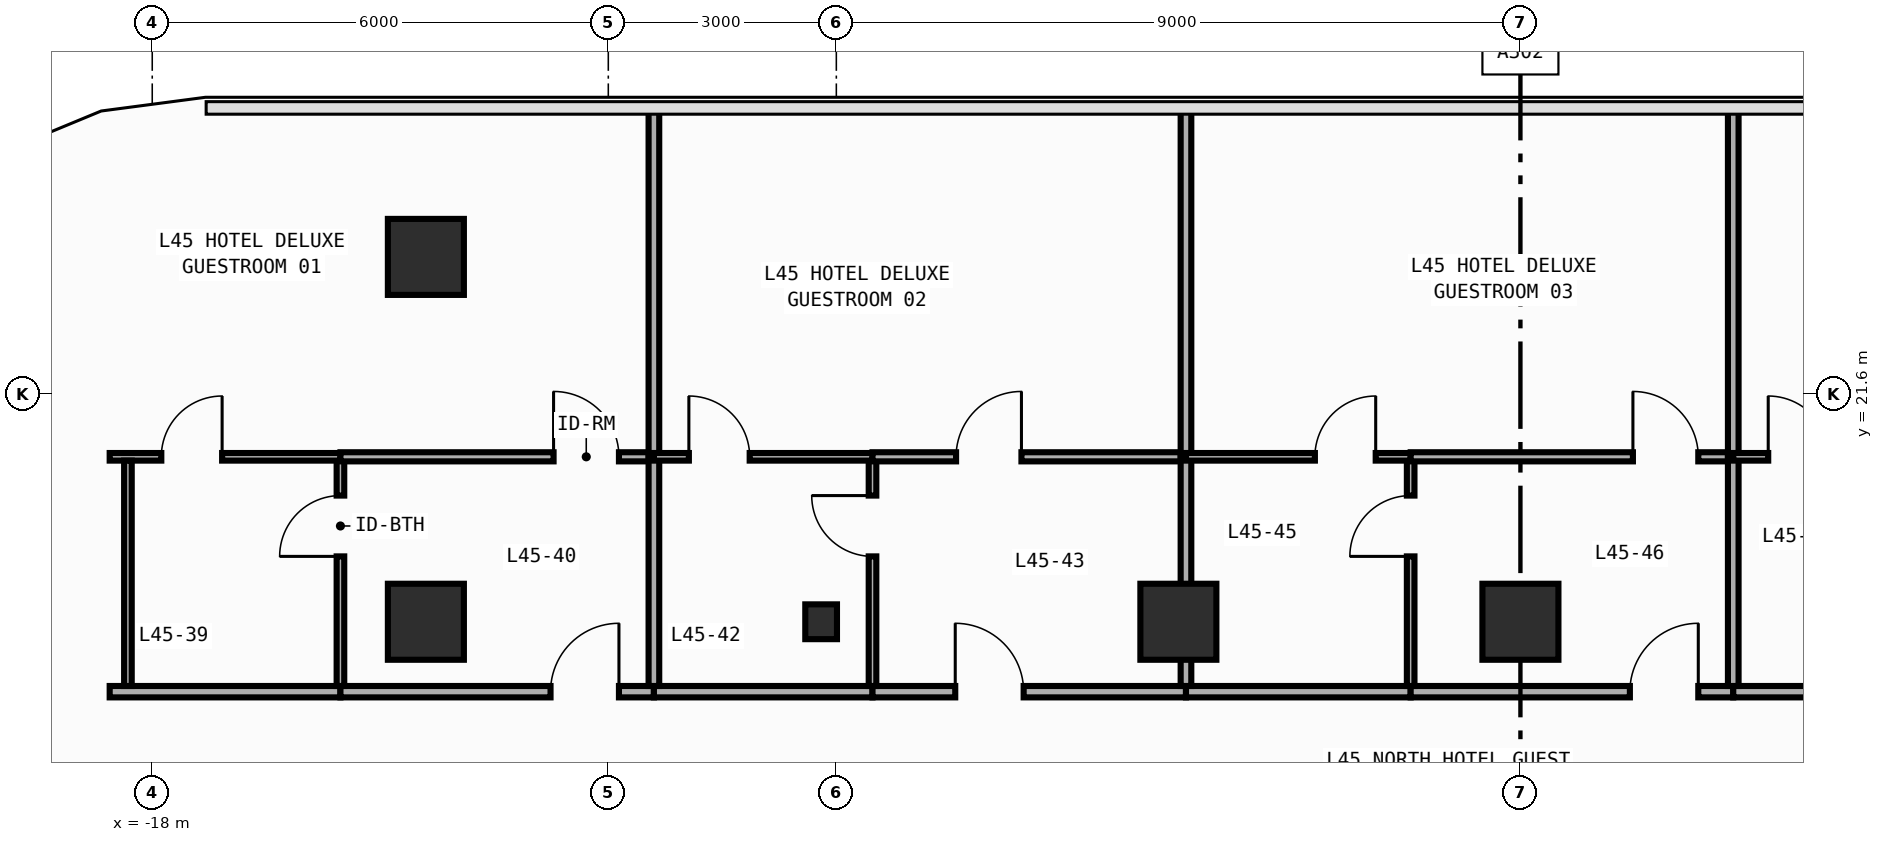
"""IFC4 building model, lengths in metres.
Left out: names, types, materials, properties, quantities, classifications, styles, units other than length and angle.
Written with IfcOpenShell. Run it as: python <this file> out.ifc"""

import sys

from ifc_helpers import new_model, si_unit, direction, frame, frame_2d, origin, origin_2d, place, context, subcontext, project, spatial, rectangle, i_section, extrude, element, fill, save


model = new_model("IFC4")
c1 = context("Model", 3, precision=1e-05, world=origin(), true_north=direction((0.0, 1.0)))
c2 = subcontext(c1, "Body", "Model", "MODEL_VIEW")
j1 = project(units=[si_unit("LENGTHUNIT", "METRE"), si_unit("PLANEANGLEUNIT", "RADIAN")], contexts=[c1])
p1 = place(None, origin())
s1 = spatial("IfcSite", under=j1, at=p1, CompositionType="ELEMENT")
p2 = place(p1, origin())
s2 = spatial("IfcBuilding", under=s1, at=p2, CompositionType="ELEMENT")
p3 = place(p2, frame((0.0, 0.0, 195.4)))
s3 = spatial("IfcBuildingStorey", under=s2, at=p3, CompositionType="ELEMENT", Elevation=195.4)
p4 = place(p3, frame((-9.2, 18.6, 0.0), z_axis=(0.0, 0.0, 1.0), x_axis=(1.0, 0.0, 0.0)))
e1 = element("IfcColumn", 1, at=p4, inside=s3, PredefinedType="COLUMN", context=c2, shape_type="SweptSolid", body=[
    extrude(i_section(OverallWidth=0.417, OverallDepth=0.458, WebThickness=0.03, FlangeThickness=0.05, FilletRadius=0.022, at=origin_2d()), origin(), (0.0, 0.0, 1.0), 3.8),
])
for number, where, z_axis, x_axis in (
    (2, (-14.4, 18.6, 0.0), (0.0, 0.0, 1.0), (1.0, 0.0, 0.0)),
    (3, (-4.5, 18.6, 0.0), (0.0, 0.0, 1.0), (1.0, 0.0, 0.0)),
    (4, (0.0, 18.6, 0.0), (0.0, 0.0, 1.0), (1.0, 0.0, 0.0)),
    (5, (-14.4, 23.4, 0.0), (0.0, 0.0, 1.0), (1.0, 0.0, 0.0)),
):
    element("IfcColumn", number, at=place(p3, frame(where, z_axis=z_axis, x_axis=x_axis)), inside=s3, PredefinedType="COLUMN", context=c2, shape_type="SweptSolid", body=[
        extrude(rectangle(XDim=1.0, YDim=1.0, at=origin_2d()), origin(), (0.0, 0.0, 1.0), 3.8),
    ])
p5 = place(p3, frame((-18.56, 17.68, 0.0), z_axis=(0.0, 0.0, 1.0), x_axis=(1.0, 0.0, 0.0)))
e6 = element("IfcWall", 6, at=p5, inside=s3, PredefinedType="PARTITIONING", context=c2, shape_type="SweptSolid", body=[
    extrude(rectangle(XDim=3.036, YDim=0.15, at=frame_2d((1.518, 0.0))), origin(), (0.0, 0.0, 1.0), 3.54),
])
p6 = place(p3, frame((-15.524, 17.68, 0.0), z_axis=(0.0, 0.0, 1.0), x_axis=(1.0, 0.0, 0.0)))
e7 = element("IfcWall", 7, at=p6, inside=s3, PredefinedType="PARTITIONING", context=c2, shape_type="SweptSolid", body=[
    extrude(rectangle(XDim=4.124, YDim=0.15, at=frame_2d((2.062, 0.0))), origin(), (0.0, 0.0, 1.0), 3.54),
])
p7 = place(p6, frame((2.764, 0.0, 0.0)))
e8 = element("IfcOpeningElement", 8, at=p7, cuts=e7, PredefinedType="OPENING", context=c2, shape_type="SweptSolid", body=[
    extrude(rectangle(XDim=0.9, YDim=2.15, at=frame_2d((0.45, 1.075))), frame((0.0, 0.085, 0.0), z_axis=(0.0, -1.0, 0.0), x_axis=(1.0, 0.0, 0.0)), (0.0, 0.0, 1.0), 0.17),
])
p8 = place(p3, frame((-11.4, 17.68, 0.0), z_axis=(0.0, 0.0, 1.0), x_axis=(1.0, 0.0, 0.0)))
e9 = element("IfcWall", 9, at=p8, inside=s3, PredefinedType="PARTITIONING", context=c2, shape_type="SweptSolid", body=[
    extrude(rectangle(XDim=2.876, YDim=0.15, at=frame_2d((1.438, 0.0))), origin(), (0.0, 0.0, 1.0), 3.54),
])
p9 = place(p3, frame((-8.524, 17.68, 0.0), z_axis=(0.0, 0.0, 1.0), x_axis=(1.0, 0.0, 0.0)))
e10 = element("IfcWall", 10, at=p9, inside=s3, PredefinedType="PARTITIONING", context=c2, shape_type="SweptSolid", body=[
    extrude(rectangle(XDim=4.124, YDim=0.15, at=frame_2d((2.062, 0.0))), origin(), (0.0, 0.0, 1.0), 3.54),
])
p10 = place(p9, frame((1.088, 0.0, 0.0)))
e11 = element("IfcOpeningElement", 11, at=p10, cuts=e10, PredefinedType="OPENING", context=c2, shape_type="SweptSolid", body=[
    extrude(rectangle(XDim=0.9, YDim=2.15, at=frame_2d((0.45, 1.075))), frame((0.0, 0.085, 0.0), z_axis=(0.0, -1.0, 0.0), x_axis=(1.0, 0.0, 0.0)), (0.0, 0.0, 1.0), 0.17),
])
p11 = place(p3, frame((-4.4, 17.68, 0.0), z_axis=(0.0, 0.0, 1.0), x_axis=(1.0, 0.0, 0.0)))
e12 = element("IfcWall", 12, at=p11, inside=s3, PredefinedType="PARTITIONING", context=c2, shape_type="SweptSolid", body=[
    extrude(rectangle(XDim=2.956, YDim=0.15, at=frame_2d((1.478, 0.0))), origin(), (0.0, 0.0, 1.0), 3.54),
])
p12 = place(p3, frame((-1.444, 17.68, 0.0), z_axis=(0.0, 0.0, 1.0), x_axis=(1.0, 0.0, 0.0)))
e13 = element("IfcWall", 13, at=p12, inside=s3, PredefinedType="PARTITIONING", context=c2, shape_type="SweptSolid", body=[
    extrude(rectangle(XDim=4.244, YDim=0.15, at=frame_2d((2.122, 0.0))), origin(), (0.0, 0.0, 1.0), 3.54),
])
p13 = place(p12, frame((2.884, 0.0, 0.0)))
e14 = element("IfcOpeningElement", 14, at=p13, cuts=e13, PredefinedType="OPENING", context=c2, shape_type="SweptSolid", body=[
    extrude(rectangle(XDim=0.9, YDim=2.15, at=frame_2d((0.45, 1.075))), frame((0.0, 0.085, 0.0), z_axis=(0.0, -1.0, 0.0), x_axis=(1.0, 0.0, 0.0)), (0.0, 0.0, 1.0), 0.17),
])
p14 = place(p3, frame((2.8, 17.68, 0.0), z_axis=(0.0, 0.0, 1.0), x_axis=(1.0, 0.0, 0.0)))
e15 = element("IfcWall", 15, at=p14, inside=s3, PredefinedType="PARTITIONING", context=c2, shape_type="SweptSolid", body=[
    extrude(rectangle(XDim=2.996, YDim=0.15, at=frame_2d((1.498, 0.0))), origin(), (0.0, 0.0, 1.0), 3.54),
])
p15 = place(p3, frame((-15.524, 17.755, 0.0), z_axis=(0.0, 0.0, 1.0), x_axis=(0.0, 1.0, 0.0)))
e16 = element("IfcWall", 16, at=p15, inside=s3, PredefinedType="PARTITIONING", context=c2, shape_type="SweptSolid", body=[
    extrude(rectangle(XDim=2.965, YDim=0.1, at=frame_2d((1.482, 0.0))), origin(), (0.0, 0.0, 1.0), 3.54),
])
p16 = place(p15, frame((1.705, 0.0, 0.0)))
e17 = element("IfcOpeningElement", 17, at=p16, cuts=e16, PredefinedType="OPENING", context=c2, shape_type="SweptSolid", body=[
    extrude(rectangle(XDim=0.8, YDim=2.1, at=frame_2d((0.4, 1.05))), frame((0.0, 0.06, 0.0), z_axis=(0.0, -1.0, 0.0), x_axis=(1.0, 0.0, 0.0)), (0.0, 0.0, 1.0), 0.12),
])
p17 = place(p3, frame((-18.56, 20.77, 0.0), z_axis=(0.0, 0.0, 1.0), x_axis=(1.0, 0.0, 0.0)))
e18 = element("IfcWall", 18, at=p17, inside=s3, PredefinedType="PARTITIONING", context=c2, shape_type="SweptSolid", body=[
    extrude(rectangle(XDim=3.036, YDim=0.1, at=frame_2d((1.518, 0.0))), origin(), (0.0, 0.0, 1.0), 3.54),
])
p18 = place(p17, frame((0.679, 0.0, 0.0)))
e19 = element("IfcOpeningElement", 19, at=p18, cuts=e18, PredefinedType="OPENING", context=c2, shape_type="SweptSolid", body=[
    extrude(rectangle(XDim=0.8, YDim=2.1, at=frame_2d((0.4, 1.05))), frame((0.0, 0.06, 0.0), z_axis=(0.0, -1.0, 0.0), x_axis=(1.0, 0.0, 0.0)), (0.0, 0.0, 1.0), 0.12),
])
p19 = place(p3, frame((-15.524, 20.77, 0.0), z_axis=(0.0, 0.0, 1.0), x_axis=(1.0, 0.0, 0.0)))
e20 = element("IfcWall", 20, at=p19, inside=s3, PredefinedType="PARTITIONING", context=c2, shape_type="SweptSolid", body=[
    extrude(rectangle(XDim=4.124, YDim=0.12, at=frame_2d((2.062, 0.0))), origin(), (0.0, 0.0, 1.0), 3.54),
])
p20 = place(p19, frame((2.804, 0.0, 0.0)))
e21 = element("IfcOpeningElement", 21, at=p20, cuts=e20, PredefinedType="OPENING", context=c2, shape_type="SweptSolid", body=[
    extrude(rectangle(XDim=0.86, YDim=2.15, at=frame_2d((0.43, 1.075))), frame((0.0, 0.07, 0.0), z_axis=(0.0, -1.0, 0.0), x_axis=(1.0, 0.0, 0.0)), (0.0, 0.0, 1.0), 0.14),
])
p21 = place(p3, frame((-11.4, 17.755, 0.0), z_axis=(0.0, 0.0, 1.0), x_axis=(0.0, 1.0, 0.0)))
e22 = element("IfcWall", 22, at=p21, inside=s3, PredefinedType="PARTITIONING", context=c2, shape_type="SweptSolid", body=[
    extrude(rectangle(XDim=3.015, YDim=0.14, at=frame_2d((1.508, 0.0))), origin(), (0.0, 0.0, 1.0), 3.54),
])
p22 = place(p3, frame((-11.4, 20.77, 0.0), z_axis=(0.0, 0.0, 1.0), x_axis=(0.0, 1.0, 0.0)))
e23 = element("IfcWall", 23, at=p22, inside=s3, PredefinedType="PARTITIONING", context=c2, shape_type="SweptSolid", body=[
    extrude(rectangle(XDim=4.585, YDim=0.14, at=frame_2d((2.292, 0.0))), origin(), (0.0, 0.0, 1.0), 3.54),
])
p23 = place(p3, frame((-8.524, 17.755, 0.0), z_axis=(0.0, 0.0, 1.0), x_axis=(0.0, 1.0, 0.0)))
e24 = element("IfcWall", 24, at=p23, inside=s3, PredefinedType="PARTITIONING", context=c2, shape_type="SweptSolid", body=[
    extrude(rectangle(XDim=2.965, YDim=0.1, at=frame_2d((1.482, 0.0))), origin(), (0.0, 0.0, 1.0), 3.54),
])
p24 = place(p23, frame((1.705, 0.0, 0.0)))
e25 = element("IfcOpeningElement", 25, at=p24, cuts=e24, PredefinedType="OPENING", context=c2, shape_type="SweptSolid", body=[
    extrude(rectangle(XDim=0.8, YDim=2.1, at=frame_2d((0.4, 1.05))), frame((0.0, 0.06, 0.0), z_axis=(0.0, -1.0, 0.0), x_axis=(1.0, 0.0, 0.0)), (0.0, 0.0, 1.0), 0.12),
])
p25 = place(p3, frame((-11.4, 20.77, 0.0), z_axis=(0.0, 0.0, 1.0), x_axis=(1.0, 0.0, 0.0)))
e26 = element("IfcWall", 26, at=p25, inside=s3, PredefinedType="PARTITIONING", context=c2, shape_type="SweptSolid", body=[
    extrude(rectangle(XDim=2.876, YDim=0.1, at=frame_2d((1.438, 0.0))), origin(), (0.0, 0.0, 1.0), 3.54),
])
p26 = place(p25, frame((0.46, 0.0, 0.0)))
e27 = element("IfcOpeningElement", 27, at=p26, cuts=e26, PredefinedType="OPENING", context=c2, shape_type="SweptSolid", body=[
    extrude(rectangle(XDim=0.8, YDim=2.1, at=frame_2d((0.4, 1.05))), frame((0.0, 0.06, 0.0), z_axis=(0.0, -1.0, 0.0), x_axis=(1.0, 0.0, 0.0)), (0.0, 0.0, 1.0), 0.12),
])
p27 = place(p3, frame((-8.524, 20.77, 0.0), z_axis=(0.0, 0.0, 1.0), x_axis=(1.0, 0.0, 0.0)))
e28 = element("IfcWall", 28, at=p27, inside=s3, PredefinedType="PARTITIONING", context=c2, shape_type="SweptSolid", body=[
    extrude(rectangle(XDim=4.124, YDim=0.12, at=frame_2d((2.062, 0.0))), origin(), (0.0, 0.0, 1.0), 3.54),
])
p28 = place(p27, frame((1.099, 0.0, 0.0)))
e29 = element("IfcOpeningElement", 29, at=p28, cuts=e28, PredefinedType="OPENING", context=c2, shape_type="SweptSolid", body=[
    extrude(rectangle(XDim=0.86, YDim=2.15, at=frame_2d((0.43, 1.075))), frame((0.0, 0.07, 0.0), z_axis=(0.0, -1.0, 0.0), x_axis=(1.0, 0.0, 0.0)), (0.0, 0.0, 1.0), 0.14),
])
p29 = place(p3, frame((-4.4, 17.755, 0.0), z_axis=(0.0, 0.0, 1.0), x_axis=(0.0, 1.0, 0.0)))
e30 = element("IfcWall", 30, at=p29, inside=s3, PredefinedType="PARTITIONING", context=c2, shape_type="SweptSolid", body=[
    extrude(rectangle(XDim=3.015, YDim=0.14, at=frame_2d((1.508, 0.0))), origin(), (0.0, 0.0, 1.0), 3.54),
])
p30 = place(p3, frame((-4.4, 20.77, 0.0), z_axis=(0.0, 0.0, 1.0), x_axis=(0.0, 1.0, 0.0)))
e31 = element("IfcWall", 31, at=p30, inside=s3, PredefinedType="PARTITIONING", context=c2, shape_type="SweptSolid", body=[
    extrude(rectangle(XDim=4.585, YDim=0.14, at=frame_2d((2.292, 0.0))), origin(), (0.0, 0.0, 1.0), 3.54),
])
p31 = place(p3, frame((-1.444, 17.755, 0.0), z_axis=(0.0, 0.0, 1.0), x_axis=(0.0, 1.0, 0.0)))
e32 = element("IfcWall", 32, at=p31, inside=s3, PredefinedType="PARTITIONING", context=c2, shape_type="SweptSolid", body=[
    extrude(rectangle(XDim=2.965, YDim=0.1, at=frame_2d((1.482, 0.0))), origin(), (0.0, 0.0, 1.0), 3.54),
])
p32 = place(p31, frame((1.705, 0.0, 0.0)))
e33 = element("IfcOpeningElement", 33, at=p32, cuts=e32, PredefinedType="OPENING", context=c2, shape_type="SweptSolid", body=[
    extrude(rectangle(XDim=0.8, YDim=2.1, at=frame_2d((0.4, 1.05))), frame((0.0, 0.06, 0.0), z_axis=(0.0, -1.0, 0.0), x_axis=(1.0, 0.0, 0.0)), (0.0, 0.0, 1.0), 0.12),
])
p33 = place(p3, frame((-4.4, 20.77, 0.0), z_axis=(0.0, 0.0, 1.0), x_axis=(1.0, 0.0, 0.0)))
e34 = element("IfcWall", 34, at=p33, inside=s3, PredefinedType="PARTITIONING", context=c2, shape_type="SweptSolid", body=[
    extrude(rectangle(XDim=2.956, YDim=0.1, at=frame_2d((1.478, 0.0))), origin(), (0.0, 0.0, 1.0), 3.54),
])
p34 = place(p33, frame((1.696, 0.0, 0.0)))
e35 = element("IfcOpeningElement", 35, at=p34, cuts=e34, PredefinedType="OPENING", context=c2, shape_type="SweptSolid", body=[
    extrude(rectangle(XDim=0.8, YDim=2.1, at=frame_2d((0.4, 1.05))), frame((0.0, 0.06, 0.0), z_axis=(0.0, -1.0, 0.0), x_axis=(1.0, 0.0, 0.0)), (0.0, 0.0, 1.0), 0.12),
])
p35 = place(p3, frame((-1.444, 20.77, 0.0), z_axis=(0.0, 0.0, 1.0), x_axis=(1.0, 0.0, 0.0)))
e36 = element("IfcWall", 36, at=p35, inside=s3, PredefinedType="PARTITIONING", context=c2, shape_type="SweptSolid", body=[
    extrude(rectangle(XDim=4.244, YDim=0.12, at=frame_2d((2.122, 0.0))), origin(), (0.0, 0.0, 1.0), 3.54),
])
p36 = place(p35, frame((2.924, 0.0, 0.0)))
e37 = element("IfcOpeningElement", 37, at=p36, cuts=e36, PredefinedType="OPENING", context=c2, shape_type="SweptSolid", body=[
    extrude(rectangle(XDim=0.86, YDim=2.15, at=frame_2d((0.43, 1.075))), frame((0.0, 0.07, 0.0), z_axis=(0.0, -1.0, 0.0), x_axis=(1.0, 0.0, 0.0)), (0.0, 0.0, 1.0), 0.14),
])
p37 = place(p3, frame((2.8, 17.755, 0.0), z_axis=(0.0, 0.0, 1.0), x_axis=(0.0, 1.0, 0.0)))
e38 = element("IfcWall", 38, at=p37, inside=s3, PredefinedType="PARTITIONING", context=c2, shape_type="SweptSolid", body=[
    extrude(rectangle(XDim=3.015, YDim=0.14, at=frame_2d((1.508, 0.0))), origin(), (0.0, 0.0, 1.0), 3.54),
])
p38 = place(p3, frame((2.8, 20.77, 0.0), z_axis=(0.0, 0.0, 1.0), x_axis=(0.0, 1.0, 0.0)))
e39 = element("IfcWall", 39, at=p38, inside=s3, PredefinedType="PARTITIONING", context=c2, shape_type="SweptSolid", body=[
    extrude(rectangle(XDim=4.585, YDim=0.14, at=frame_2d((2.292, 0.0))), origin(), (0.0, 0.0, 1.0), 3.54),
])
p39 = place(p3, frame((2.8, 20.77, 0.0), z_axis=(0.0, 0.0, 1.0), x_axis=(1.0, 0.0, 0.0)))
e40 = element("IfcWall", 40, at=p39, inside=s3, PredefinedType="PARTITIONING", context=c2, shape_type="SweptSolid", body=[
    extrude(rectangle(XDim=2.996, YDim=0.1, at=frame_2d((1.498, 0.0))), origin(), (0.0, 0.0, 1.0), 3.54),
])
p40 = place(p39, frame((0.46, 0.0, 0.0)))
e41 = element("IfcOpeningElement", 41, at=p40, cuts=e40, PredefinedType="OPENING", context=c2, shape_type="SweptSolid", body=[
    extrude(rectangle(XDim=0.8, YDim=2.1, at=frame_2d((0.4, 1.05))), frame((0.0, 0.06, 0.0), z_axis=(0.0, -1.0, 0.0), x_axis=(1.0, 0.0, 0.0)), (0.0, 0.0, 1.0), 0.12),
])
p41 = place(p3, frame((-18.32, 17.755, 0.0), z_axis=(0.0, 0.0, 1.0), x_axis=(0.0, 1.0, 0.0)))
e42 = element("IfcWall", 42, at=p41, inside=s3, PredefinedType="PARTITIONING", context=c2, shape_type="SweptSolid", body=[
    extrude(rectangle(XDim=2.965, YDim=0.1, at=frame_2d((1.482, 0.0))), origin(), (0.0, 0.0, 1.0), 3.54),
])
p42 = place(p7, origin())
e43 = element("IfcDoor", 43, at=p42, inside=s3, OperationType="SINGLE_SWING_RIGHT", PredefinedType="DOOR", context=c2, shape_type="SweptSolid", body=[
    extrude(rectangle(XDim=0.9, YDim=2.15, at=frame_2d((0.45, 1.075))), frame((0.0, 0.025, 0.0), z_axis=(0.0, -1.0, 0.0), x_axis=(1.0, 0.0, 0.0)), (0.0, 0.0, 1.0), 0.05),
])
fill(e8, e43)
p43 = place(p10, origin())
e44 = element("IfcDoor", 44, at=p43, inside=s3, OperationType="SINGLE_SWING_LEFT", PredefinedType="DOOR", context=c2, shape_type="SweptSolid", body=[
    extrude(rectangle(XDim=0.9, YDim=2.15, at=frame_2d((0.45, 1.075))), frame((0.0, 0.025, 0.0), z_axis=(0.0, -1.0, 0.0), x_axis=(1.0, 0.0, 0.0)), (0.0, 0.0, 1.0), 0.05),
])
fill(e11, e44)
p44 = place(p13, origin())
e45 = element("IfcDoor", 45, at=p44, inside=s3, OperationType="SINGLE_SWING_RIGHT", PredefinedType="DOOR", context=c2, shape_type="SweptSolid", body=[
    extrude(rectangle(XDim=0.9, YDim=2.15, at=frame_2d((0.45, 1.075))), frame((0.0, 0.025, 0.0), z_axis=(0.0, -1.0, 0.0), x_axis=(1.0, 0.0, 0.0)), (0.0, 0.0, 1.0), 0.05),
])
fill(e14, e45)
p45 = place(p16, origin())
e46 = element("IfcDoor", 46, at=p45, inside=s3, OperationType="SINGLE_SWING_LEFT", PredefinedType="DOOR", context=c2, shape_type="SweptSolid", body=[
    extrude(rectangle(XDim=0.8, YDim=2.1, at=frame_2d((0.4, 1.05))), frame((0.0, 0.025, 0.0), z_axis=(0.0, -1.0, 0.0), x_axis=(1.0, 0.0, 0.0)), (0.0, 0.0, 1.0), 0.05),
])
fill(e17, e46)
p46 = place(p18, origin())
e47 = element("IfcDoor", 47, at=p46, inside=s3, OperationType="SINGLE_SWING_RIGHT", PredefinedType="DOOR", context=c2, shape_type="SweptSolid", body=[
    extrude(rectangle(XDim=0.8, YDim=2.1, at=frame_2d((0.4, 1.05))), frame((0.0, 0.025, 0.0), z_axis=(0.0, -1.0, 0.0), x_axis=(1.0, 0.0, 0.0)), (0.0, 0.0, 1.0), 0.05),
])
fill(e19, e47)
p47 = place(p20, origin())
e48 = element("IfcDoor", 48, at=p47, inside=s3, OperationType="SINGLE_SWING_LEFT", PredefinedType="DOOR", context=c2, shape_type="SweptSolid", body=[
    extrude(rectangle(XDim=0.86, YDim=2.15, at=frame_2d((0.43, 1.075))), frame((0.0, 0.025, 0.0), z_axis=(0.0, -1.0, 0.0), x_axis=(1.0, 0.0, 0.0)), (0.0, 0.0, 1.0), 0.05),
])
fill(e21, e48)
p48 = place(p24, origin())
e49 = element("IfcDoor", 49, at=p48, inside=s3, OperationType="SINGLE_SWING_RIGHT", PredefinedType="DOOR", context=c2, shape_type="SweptSolid", body=[
    extrude(rectangle(XDim=0.8, YDim=2.1, at=frame_2d((0.4, 1.05))), frame((0.0, 0.025, 0.0), z_axis=(0.0, -1.0, 0.0), x_axis=(1.0, 0.0, 0.0)), (0.0, 0.0, 1.0), 0.05),
])
fill(e25, e49)
p49 = place(p26, origin())
e50 = element("IfcDoor", 50, at=p49, inside=s3, OperationType="SINGLE_SWING_LEFT", PredefinedType="DOOR", context=c2, shape_type="SweptSolid", body=[
    extrude(rectangle(XDim=0.8, YDim=2.1, at=frame_2d((0.4, 1.05))), frame((0.0, 0.025, 0.0), z_axis=(0.0, -1.0, 0.0), x_axis=(1.0, 0.0, 0.0)), (0.0, 0.0, 1.0), 0.05),
])
fill(e27, e50)
p50 = place(p28, origin())
e51 = element("IfcDoor", 51, at=p50, inside=s3, OperationType="SINGLE_SWING_RIGHT", PredefinedType="DOOR", context=c2, shape_type="SweptSolid", body=[
    extrude(rectangle(XDim=0.86, YDim=2.15, at=frame_2d((0.43, 1.075))), frame((0.0, 0.025, 0.0), z_axis=(0.0, -1.0, 0.0), x_axis=(1.0, 0.0, 0.0)), (0.0, 0.0, 1.0), 0.05),
])
fill(e29, e51)
p51 = place(p32, origin())
e52 = element("IfcDoor", 52, at=p51, inside=s3, OperationType="SINGLE_SWING_LEFT", PredefinedType="DOOR", context=c2, shape_type="SweptSolid", body=[
    extrude(rectangle(XDim=0.8, YDim=2.1, at=frame_2d((0.4, 1.05))), frame((0.0, 0.025, 0.0), z_axis=(0.0, -1.0, 0.0), x_axis=(1.0, 0.0, 0.0)), (0.0, 0.0, 1.0), 0.05),
])
fill(e33, e52)
p52 = place(p34, origin())
e53 = element("IfcDoor", 53, at=p52, inside=s3, OperationType="SINGLE_SWING_RIGHT", PredefinedType="DOOR", context=c2, shape_type="SweptSolid", body=[
    extrude(rectangle(XDim=0.8, YDim=2.1, at=frame_2d((0.4, 1.05))), frame((0.0, 0.025, 0.0), z_axis=(0.0, -1.0, 0.0), x_axis=(1.0, 0.0, 0.0)), (0.0, 0.0, 1.0), 0.05),
])
fill(e35, e53)
p53 = place(p36, origin())
e54 = element("IfcDoor", 54, at=p53, inside=s3, OperationType="SINGLE_SWING_LEFT", PredefinedType="DOOR", context=c2, shape_type="SweptSolid", body=[
    extrude(rectangle(XDim=0.86, YDim=2.15, at=frame_2d((0.43, 1.075))), frame((0.0, 0.025, 0.0), z_axis=(0.0, -1.0, 0.0), x_axis=(1.0, 0.0, 0.0)), (0.0, 0.0, 1.0), 0.05),
])
fill(e37, e54)
p54 = place(p40, origin())
e55 = element("IfcDoor", 55, at=p54, inside=s3, OperationType="SINGLE_SWING_LEFT", PredefinedType="DOOR", context=c2, shape_type="SweptSolid", body=[
    extrude(rectangle(XDim=0.8, YDim=2.1, at=frame_2d((0.4, 1.05))), frame((0.0, 0.025, 0.0), z_axis=(0.0, -1.0, 0.0), x_axis=(1.0, 0.0, 0.0)), (0.0, 0.0, 1.0), 0.05),
])
fill(e41, e55)
save(model, sys.argv[1])
